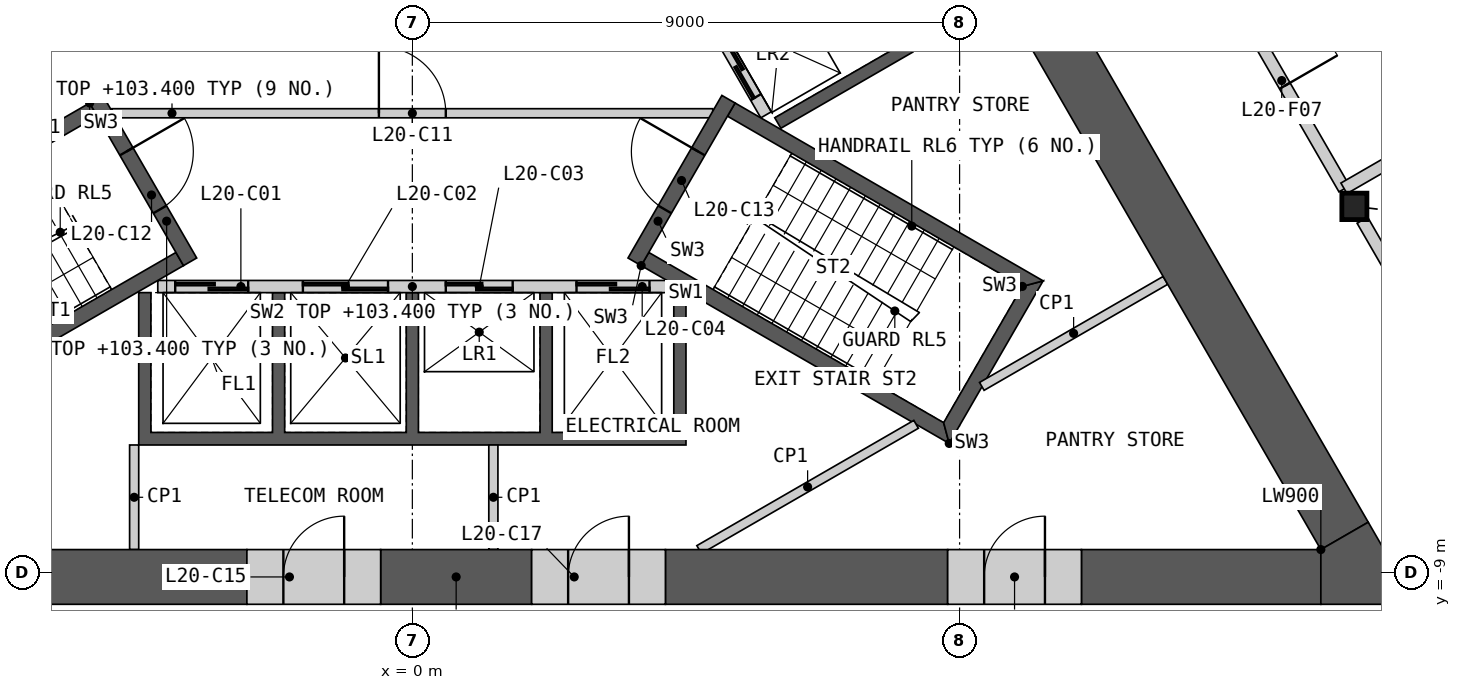
"""IFC4 building model, lengths in metres.
Left out: names, types, materials, properties, quantities, classifications, styles, units other than length and angle.
Written with IfcOpenShell. Run it as: python <this file> out.ifc"""

import sys

from ifc_helpers import new_model, si_unit, direction, frame, frame_2d, origin, origin_2d, place, context, subcontext, project, spatial, polyline, rectangle, i_section, outline, extrude, element, fill, save


model = new_model("IFC4")
c1 = context("Model", 3, precision=1e-05, world=origin(), true_north=direction((0.0, 1.0)))
c2 = subcontext(c1, "Body", "Model", "MODEL_VIEW")
j1 = project(units=[si_unit("LENGTHUNIT", "METRE"), si_unit("PLANEANGLEUNIT", "RADIAN")], contexts=[c1])
p1 = place(None, origin())
s1 = spatial("IfcSite", under=j1, at=p1, CompositionType="ELEMENT")
p2 = place(p1, origin())
s2 = spatial("IfcBuilding", under=s1, at=p2, CompositionType="ELEMENT")
p3 = place(p2, frame((0.0, 0.0, 99.6)))
s3 = spatial("IfcBuildingStorey", under=s2, at=p3, CompositionType="ELEMENT", Elevation=99.6)
p4 = place(p3, frame((15.493, -2.982, 0.0), z_axis=(0.0, 0.0, 1.0), x_axis=(1.0, 0.0, 0.0)))
e1 = element("IfcColumn", 1, at=p4, inside=s3, PredefinedType="COLUMN", context=c2, shape_type="SweptSolid", body=[
    extrude(i_section(OverallWidth=0.412, OverallDepth=0.435, WebThickness=0.036, FlangeThickness=0.057, at=origin_2d()), origin(), (0.0, 0.0, 1.0), 4.2),
])
p5 = place(p3, origin())
e2 = element("IfcWall", 2, at=p5, inside=s3, PredefinedType="SHEAR", context=c2, shape_type="SweptSolid", body=[
    extrude(outline(polyline([(4.5, -4.4), (4.5, -6.906), (-4.5, -6.906), (-4.5, -4.4), (-4.3, -4.4), (-4.3, -6.7), (-2.3, -6.7), (-2.3, -4.4), (-2.1, -4.4), (-2.1, -6.7), (-0.1, -6.7), (-0.1, -4.4), (0.1, -4.4), (0.1, -6.7), (2.1, -6.7), (2.1, -4.4), (2.3, -4.4), (2.3, -6.7), (4.3, -6.7), (4.3, -4.4), (4.5, -4.4)])), origin(), (0.0, 0.0, 1.0), 3.8),
])
p6 = place(p3, frame((-4.187, -4.3, 0.0), z_axis=(0.0, 0.0, 1.0), x_axis=(1.0, 0.0, 0.0)))
e3 = element("IfcWall", 3, at=p6, inside=s3, PredefinedType="SOLIDWALL", context=c2, shape_type="SweptSolid", body=[
    extrude(rectangle(XDim=8.373, YDim=0.2, at=frame_2d((4.187, 0.0))), origin(), (0.0, 0.0, 1.0), 3.8),
])
p7 = place(p6, frame((0.287, 0.0, 0.0)))
e4 = element("IfcOpeningElement", 4, at=p7, cuts=e3, PredefinedType="OPENING", context=c2, shape_type="SweptSolid", body=[
    extrude(rectangle(XDim=1.2, YDim=2.1, at=frame_2d((0.6, 1.05))), frame((0.0, 0.11, 0.0), z_axis=(0.0, -1.0, 0.0), x_axis=(1.0, 0.0, 0.0)), (0.0, 0.0, 1.0), 0.22),
])
p8 = place(p6, frame((2.387, 0.0, 0.0)))
e5 = element("IfcOpeningElement", 5, at=p8, cuts=e3, PredefinedType="OPENING", context=c2, shape_type="SweptSolid", body=[
    extrude(rectangle(XDim=1.4, YDim=2.1, at=frame_2d((0.7, 1.05))), frame((0.0, 0.11, 0.0), z_axis=(0.0, -1.0, 0.0), x_axis=(1.0, 0.0, 0.0)), (0.0, 0.0, 1.0), 0.22),
])
p9 = place(p6, frame((4.737, 0.0, 0.0)))
e6 = element("IfcOpeningElement", 6, at=p9, cuts=e3, PredefinedType="OPENING", context=c2, shape_type="SweptSolid", body=[
    extrude(rectangle(XDim=1.1, YDim=2.1, at=frame_2d((0.55, 1.05))), frame((0.0, 0.11, 0.0), z_axis=(0.0, -1.0, 0.0), x_axis=(1.0, 0.0, 0.0)), (0.0, 0.0, 1.0), 0.22),
])
p10 = place(p6, frame((6.887, 0.0, 0.0)))
e7 = element("IfcOpeningElement", 7, at=p10, cuts=e3, PredefinedType="OPENING", context=c2, shape_type="SweptSolid", body=[
    extrude(rectangle(XDim=1.2, YDim=2.1, at=frame_2d((0.6, 1.05))), frame((0.0, 0.11, 0.0), z_axis=(0.0, -1.0, 0.0), x_axis=(1.0, 0.0, 0.0)), (0.0, 0.0, 1.0), 0.22),
])
p11 = place(p3, origin())
e8 = element("IfcWall", 8, at=p11, inside=s3, PredefinedType="SHEAR", context=c2, shape_type="SweptSolid", body=[
    extrude(outline(polyline([(2.66, 4.192), (4.831, 5.445), (8.231, -0.444), (6.061, -1.697), (5.96, -1.524), (7.952, -0.374), (6.952, 1.358), (4.96, 0.208), (4.861, 0.381), (6.852, 1.531), (5.852, 3.263), (3.861, 2.113), (3.76, 2.287), (5.752, 3.437), (4.752, 5.169), (2.76, 4.019), (2.66, 4.192)])), origin(), (0.0, 0.0, 1.0), 3.8),
])
p12 = place(p3, frame((5.817, -1.476, 0.0), z_axis=(0.0, 0.0, 1.0), x_axis=(-0.500002616675, 0.866023893041, 0.0)))
e9 = element("IfcWall", 9, at=p12, inside=s3, PredefinedType="SOLIDWALL", context=c2, shape_type="SweptSolid", body=[
    extrude(rectangle(XDim=8.373, YDim=0.2, at=frame_2d((4.187, 0.0))), origin(), (0.0, 0.0, 1.0), 3.8),
])
p13 = place(p12, frame((0.337, 0.0, 0.0)))
e10 = element("IfcOpeningElement", 10, at=p13, cuts=e9, PredefinedType="OPENING", context=c2, shape_type="SweptSolid", body=[
    extrude(rectangle(XDim=1.1, YDim=2.1, at=frame_2d((0.55, 1.05))), frame((0.0, 0.11, 0.0), z_axis=(0.0, -1.0, 0.0), x_axis=(1.0, 0.0, 0.0)), (0.0, 0.0, 1.0), 0.22),
])
p14 = place(p12, frame((2.537, 0.0, 0.0)))
e11 = element("IfcOpeningElement", 11, at=p14, cuts=e9, PredefinedType="OPENING", context=c2, shape_type="SweptSolid", body=[
    extrude(rectangle(XDim=1.1, YDim=2.1, at=frame_2d((0.55, 1.05))), frame((0.0, 0.11, 0.0), z_axis=(0.0, -1.0, 0.0), x_axis=(1.0, 0.0, 0.0)), (0.0, 0.0, 1.0), 0.22),
])
p15 = place(p12, frame((4.737, 0.0, 0.0)))
e12 = element("IfcOpeningElement", 12, at=p15, cuts=e9, PredefinedType="OPENING", context=c2, shape_type="SweptSolid", body=[
    extrude(rectangle(XDim=1.1, YDim=2.1, at=frame_2d((0.55, 1.05))), frame((0.0, 0.11, 0.0), z_axis=(0.0, -1.0, 0.0), x_axis=(1.0, 0.0, 0.0)), (0.0, 0.0, 1.0), 0.22),
])
p16 = place(p12, frame((7.037, 0.0, 0.0)))
e13 = element("IfcOpeningElement", 13, at=p16, cuts=e9, PredefinedType="OPENING", context=c2, shape_type="SweptSolid", body=[
    extrude(rectangle(XDim=0.9, YDim=2.1, at=frame_2d((0.45, 1.05))), frame((0.0, 0.11, 0.0), z_axis=(0.0, -1.0, 0.0), x_axis=(1.0, 0.0, 0.0)), (0.0, 0.0, 1.0), 0.22),
])
p17 = place(p3, frame((-4.941, -1.45, 0.0), z_axis=(0.0, 0.0, 1.0), x_axis=(1.0, 0.0, 0.0)))
e14 = element("IfcWall", 14, at=p17, inside=s3, PredefinedType="PARTITIONING", context=c2, shape_type="SweptSolid", body=[
    extrude(rectangle(XDim=9.882, YDim=0.15, at=frame_2d((4.941, 0.0))), origin(), (0.0, 0.0, 1.0), 3.8),
])
p18 = place(p17, frame((4.391, 0.0, 0.0)))
e15 = element("IfcOpeningElement", 15, at=p18, cuts=e14, PredefinedType="OPENING", context=c2, shape_type="SweptSolid", body=[
    extrude(rectangle(XDim=1.1, YDim=2.1, at=frame_2d((0.55, 1.05))), frame((0.0, 0.085, 0.0), z_axis=(0.0, -1.0, 0.0), x_axis=(1.0, 0.0, 0.0)), (0.0, 0.0, 1.0), 0.17),
])
p19 = place(p3, origin())
e16 = element("IfcWall", 16, at=p19, inside=s3, PredefinedType="SHEAR", context=c2, shape_type="SweptSolid", body=[
    extrude(outline(polyline([(-5.307, -1.281), (-10.374, -4.206), (-10.032, -4.298), (-5.182, -1.498), (-5.307, -1.281)])), origin(), (0.0, 0.0, 1.0), 3.8),
])
p20 = place(p3, origin())
e17 = element("IfcWall", 17, at=p20, inside=s3, PredefinedType="SHEAR", context=c2, shape_type="SweptSolid", body=[
    extrude(outline(polyline([(-8.738, -6.539), (-8.83, -6.881), (-3.763, -3.956), (-3.888, -3.739), (-8.738, -6.539)])), origin(), (0.0, 0.0, 1.0), 3.8),
])
p21 = place(p3, frame((-5.199, -1.219, 0.0), z_axis=(0.0, 0.0, 1.0), x_axis=(0.499982516597, -0.866035497597, 0.0)))
e18 = element("IfcWall", 18, at=p21, inside=s3, PredefinedType="SHEAR", context=c2, shape_type="SweptSolid", body=[
    extrude(rectangle(XDim=3.088, YDim=0.25, at=frame_2d((1.544, 0.0))), origin(), (0.0, 0.0, 1.0), 3.8),
])
p22 = place(p21, frame((0.994, 0.0, 0.0)))
e19 = element("IfcOpeningElement", 19, at=p22, cuts=e18, PredefinedType="OPENING", context=c2, shape_type="SweptSolid", body=[
    extrude(rectangle(XDim=1.1, YDim=2.1, at=frame_2d((0.55, 1.05))), frame((0.0, 0.135, 0.0), z_axis=(0.0, -1.0, 0.0), x_axis=(1.0, 0.0, 0.0)), (0.0, 0.0, 1.0), 0.27),
])
p23 = place(p3, origin())
e20 = element("IfcWall", 20, at=p23, inside=s3, PredefinedType="SHEAR", context=c2, shape_type="SweptSolid", body=[
    extrude(outline(polyline([(3.763, -3.956), (8.83, -6.881), (8.738, -6.539), (3.888, -3.739), (3.763, -3.956)])), origin(), (0.0, 0.0, 1.0), 3.8),
])
p24 = place(p3, origin())
e21 = element("IfcWall", 21, at=p24, inside=s3, PredefinedType="SHEAR", context=c2, shape_type="SweptSolid", body=[
    extrude(outline(polyline([(8.83, -6.881), (10.374, -4.206), (10.032, -4.298), (8.738, -6.539), (8.83, -6.881)])), origin(), (0.0, 0.0, 1.0), 3.8),
])
p25 = place(p3, origin())
e22 = element("IfcWall", 22, at=p25, inside=s3, PredefinedType="SHEAR", context=c2, shape_type="SweptSolid", body=[
    extrude(outline(polyline([(10.032, -4.298), (10.374, -4.206), (5.307, -1.281), (5.182, -1.498), (10.032, -4.298)])), origin(), (0.0, 0.0, 1.0), 3.8),
])
p26 = place(p3, frame((3.655, -3.893, 0.0), z_axis=(0.0, 0.0, 1.0), x_axis=(0.499982516597, 0.866035497597, 0.0)))
e23 = element("IfcWall", 23, at=p26, inside=s3, PredefinedType="SHEAR", context=c2, shape_type="SweptSolid", body=[
    extrude(rectangle(XDim=3.088, YDim=0.25, at=frame_2d((1.544, 0.0))), origin(), (0.0, 0.0, 1.0), 3.8),
])
p27 = place(p26, frame((0.994, 0.0, 0.0)))
e24 = element("IfcOpeningElement", 24, at=p27, cuts=e23, PredefinedType="OPENING", context=c2, shape_type="SweptSolid", body=[
    extrude(rectangle(XDim=1.1, YDim=2.1, at=frame_2d((0.55, 1.05))), frame((0.0, 0.135, 0.0), z_axis=(0.0, -1.0, 0.0), x_axis=(1.0, 0.0, 0.0)), (0.0, 0.0, 1.0), 0.27),
])
for number, where, z_axis, x_axis in (
    (25, (-4.575, -6.906, 0.0), (0.0, 0.0, 1.0), (0.0, -1.0, 0.0)),
    (26, (1.333, -8.626, 0.0), (0.0, 0.0, 1.0), (0.0, 1.0, 0.0)),
):
    element("IfcWall", number, at=place(p3, frame(where, z_axis=z_axis, x_axis=x_axis)), inside=s3, PredefinedType="PARTITIONING", context=c2, shape_type="SweptSolid", body=[
        extrude(rectangle(XDim=1.72, YDim=0.15, at=frame_2d((0.86, 0.0))), origin(), (0.0, 0.0, 1.0), 3.8),
    ])
p28 = place(p3, frame((8.285, -6.566, 0.0), z_axis=(0.0, 0.0, 1.0), x_axis=(-0.866039554287, -0.49997548981, 0.0)))
e27 = element("IfcWall", 27, at=p28, inside=s3, PredefinedType="PARTITIONING", context=c2, shape_type="SweptSolid", body=[
    extrude(rectangle(XDim=4.12, YDim=0.15, at=frame_2d((2.06, 0.0))), origin(), (0.0, 0.0, 1.0), 3.8),
])
p29 = place(p3, frame((12.385, -4.199, 0.0), z_axis=(0.0, 0.0, 1.0), x_axis=(-0.86604566135, -0.499964911226, 0.0)))
e28 = element("IfcWall", 28, at=p29, inside=s3, PredefinedType="PARTITIONING", context=c2, shape_type="SweptSolid", body=[
    extrude(rectangle(XDim=3.487, YDim=0.15, at=frame_2d((1.743, 0.0))), origin(), (0.0, 0.0, 1.0), 3.8),
])
p30 = place(p3, frame((4.162, -9.076, 0.0), z_axis=(0.0, 0.0, 1.0), x_axis=(1.0, 0.0, 0.0)))
e29 = element("IfcWall", 29, at=p30, inside=s3, PredefinedType="SHEAR", context=c2, shape_type="SweptSolid", body=[
    extrude(rectangle(XDim=4.642, YDim=0.9, at=frame_2d((2.321, 0.0))), origin(), (0.0, 0.0, 1.0), 3.8),
])
p31 = place(p3, frame((-7.115, -9.076, 0.0), z_axis=(0.0, 0.0, 1.0), x_axis=(1.0, 0.0, 0.0)))
e30 = element("IfcWall", 30, at=p31, inside=s3, PredefinedType="SHEAR", context=c2, shape_type="SweptSolid", body=[
    extrude(rectangle(XDim=4.393, YDim=0.9, at=frame_2d((2.197, 0.0))), origin(), (0.0, 0.0, 1.0), 3.8),
])
p32 = place(p3, frame((11.004, -9.076, 0.0), z_axis=(0.0, 0.0, 1.0), x_axis=(1.0, 0.0, 0.0)))
e31 = element("IfcWall", 31, at=p32, inside=s3, PredefinedType="SHEAR", context=c2, shape_type="SweptSolid", body=[
    extrude(rectangle(XDim=3.937, YDim=0.9, at=frame_2d((1.969, 0.0))), origin(), (0.0, 0.0, 1.0), 3.8),
])
p33 = place(p3, frame((-0.521, -9.076, 0.0), z_axis=(0.0, 0.0, 1.0), x_axis=(1.0, 0.0, 0.0)))
e32 = element("IfcWall", 32, at=p33, inside=s3, PredefinedType="SHEAR", context=c2, shape_type="SweptSolid", body=[
    extrude(rectangle(XDim=2.483, YDim=0.9, at=frame_2d((1.242, 0.0))), origin(), (0.0, 0.0, 1.0), 3.8),
])
p34 = place(p3, frame((15.331, -8.401, 0.0), z_axis=(0.0, 0.0, 1.0), x_axis=(-0.499996094196, 0.86602765879, 0.0)))
e33 = element("IfcWall", 33, at=p34, inside=s3, PredefinedType="SHEAR", context=c2, shape_type="SweptSolid", body=[
    extrude(rectangle(XDim=10.014, YDim=0.9, at=frame_2d((5.007, 0.0))), origin(), (0.0, 0.0, 1.0), 3.8),
])
p35 = place(p3, origin())
e34 = element("IfcWall", 34, at=p35, inside=s3, PredefinedType="SHEAR", context=c2, shape_type="SweptSolid", body=[
    extrude(outline(polyline([(14.941, -8.626), (15.721, -8.176), (16.5, -9.526), (14.941, -9.526), (14.941, -8.626)])), origin(), (0.0, 0.0, 1.0), 3.8),
])
p36 = place(p3, frame((-2.721, -9.076, 0.0), z_axis=(0.0, 0.0, 1.0), x_axis=(1.0, 0.0, 0.0)))
e35 = element("IfcWall", 35, at=p36, inside=s3, PredefinedType="SHEAR", context=c2, shape_type="SweptSolid", body=[
    extrude(rectangle(XDim=2.2, YDim=0.9, at=frame_2d((1.1, 0.0))), origin(), (0.0, 0.0, 1.0), 3.8),
])
p37 = place(p36, frame((0.6, 0.0, 0.0)))
e36 = element("IfcOpeningElement", 36, at=p37, cuts=e35, PredefinedType="OPENING", context=c2, shape_type="SweptSolid", body=[
    extrude(rectangle(XDim=1.0, YDim=2.1, at=frame_2d((0.5, 1.05))), frame((0.0, 0.46, 0.0), z_axis=(0.0, -1.0, 0.0), x_axis=(1.0, 0.0, 0.0)), (0.0, 0.0, 1.0), 0.92),
])
p38 = place(p3, frame((8.804, -9.076, 0.0), z_axis=(0.0, 0.0, 1.0), x_axis=(1.0, 0.0, 0.0)))
e37 = element("IfcWall", 37, at=p38, inside=s3, PredefinedType="SHEAR", context=c2, shape_type="SweptSolid", body=[
    extrude(rectangle(XDim=2.2, YDim=0.9, at=frame_2d((1.1, 0.0))), origin(), (0.0, 0.0, 1.0), 3.8),
])
p39 = place(p38, frame((0.6, 0.0, 0.0)))
e38 = element("IfcOpeningElement", 38, at=p39, cuts=e37, PredefinedType="OPENING", context=c2, shape_type="SweptSolid", body=[
    extrude(rectangle(XDim=1.0, YDim=2.1, at=frame_2d((0.5, 1.05))), frame((0.0, 0.46, 0.0), z_axis=(0.0, -1.0, 0.0), x_axis=(1.0, 0.0, 0.0)), (0.0, 0.0, 1.0), 0.92),
])
p40 = place(p3, frame((1.962, -9.076, 0.0), z_axis=(0.0, 0.0, 1.0), x_axis=(1.0, 0.0, 0.0)))
e39 = element("IfcWall", 39, at=p40, inside=s3, PredefinedType="SHEAR", context=c2, shape_type="SweptSolid", body=[
    extrude(rectangle(XDim=2.2, YDim=0.9, at=frame_2d((1.1, 0.0))), origin(), (0.0, 0.0, 1.0), 3.8),
])
p41 = place(p40, frame((0.6, 0.0, 0.0)))
e40 = element("IfcOpeningElement", 40, at=p41, cuts=e39, PredefinedType="OPENING", context=c2, shape_type="SweptSolid", body=[
    extrude(rectangle(XDim=1.0, YDim=2.1, at=frame_2d((0.5, 1.05))), frame((0.0, 0.46, 0.0), z_axis=(0.0, -1.0, 0.0), x_axis=(1.0, 0.0, 0.0)), (0.0, 0.0, 1.0), 0.92),
])
p42 = place(p3, frame((10.46, 5.736, 0.0), z_axis=(0.0, 0.0, 1.0), x_axis=(0.500010522431, -0.866019328571, 0.0)))
e41 = element("IfcWall", 41, at=p42, inside=s3, PredefinedType="PARTITIONING", context=c2, shape_type="SweptSolid", body=[
    extrude(rectangle(XDim=9.733, YDim=0.2, at=frame_2d((4.866, 0.0))), origin(), (0.0, 0.0, 1.0), 3.8),
])
p43 = place(p42, frame((6.776, 0.0, 0.0)))
e42 = element("IfcOpeningElement", 42, at=p43, cuts=e41, PredefinedType="OPENING", context=c2, shape_type="SweptSolid", body=[
    extrude(rectangle(XDim=1.0, YDim=2.1, at=frame_2d((0.5, 1.05))), frame((0.0, 0.11, 0.0), z_axis=(0.0, -1.0, 0.0), x_axis=(1.0, 0.0, 0.0)), (0.0, 0.0, 1.0), 0.22),
])
p44 = place(p42, frame((1.856, 0.0, 0.0)))
e43 = element("IfcOpeningElement", 43, at=p44, cuts=e41, PredefinedType="OPENING", context=c2, shape_type="SweptSolid", body=[
    extrude(rectangle(XDim=1.0, YDim=2.1, at=frame_2d((0.5, 1.05))), frame((0.0, 0.11, 0.0), z_axis=(0.0, -1.0, 0.0), x_axis=(1.0, 0.0, 0.0)), (0.0, 0.0, 1.0), 0.22),
])
p45 = place(p3, frame((15.624, -3.209, 0.0), z_axis=(0.0, 0.0, 1.0), x_axis=(0.499997920671, -0.866026604282, 0.0)))
e44 = element("IfcWall", 44, at=p45, inside=s3, PredefinedType="PARTITIONING", context=c2, shape_type="SweptSolid", body=[
    extrude(rectangle(XDim=6.24, YDim=0.2, at=frame_2d((3.12, 0.0))), origin(), (0.0, 0.0, 1.0), 3.8),
])
p46 = place(p45, frame((2.57, 0.0, 0.0)))
e45 = element("IfcOpeningElement", 45, at=p46, cuts=e44, PredefinedType="OPENING", context=c2, shape_type="SweptSolid", body=[
    extrude(rectangle(XDim=1.0, YDim=2.1, at=frame_2d((0.5, 1.05))), frame((0.0, 0.11, 0.0), z_axis=(0.0, -1.0, 0.0), x_axis=(1.0, 0.0, 0.0)), (0.0, 0.0, 1.0), 0.22),
])
p47 = place(p3, frame((15.321, -2.684, 0.0), z_axis=(0.0, 0.0, 1.0), x_axis=(0.866029068465, 0.499993652534, 0.0)))
e46 = element("IfcWall", 46, at=p47, inside=s3, PredefinedType="PARTITIONING", context=c2, shape_type="SweptSolid", body=[
    extrude(rectangle(XDim=13.066, YDim=0.2, at=frame_2d((6.533, 0.0))), origin(), (0.0, 0.0, 1.0), 2.885),
])
p48 = place(p7, origin())
e47 = element("IfcDoor", 47, at=p48, inside=s3, OperationType="SLIDING_TO_LEFT", PredefinedType="DOOR", context=c2, shape_type="SweptSolid", body=[
    extrude(rectangle(XDim=1.2, YDim=2.1, at=frame_2d((0.6, 1.05))), frame((0.0, 0.025, 0.0), z_axis=(0.0, -1.0, 0.0), x_axis=(1.0, 0.0, 0.0)), (0.0, 0.0, 1.0), 0.05),
])
fill(e4, e47)
p49 = place(p8, origin())
e48 = element("IfcDoor", 48, at=p49, inside=s3, OperationType="SLIDING_TO_LEFT", PredefinedType="DOOR", context=c2, shape_type="SweptSolid", body=[
    extrude(rectangle(XDim=1.4, YDim=2.1, at=frame_2d((0.7, 1.05))), frame((0.0, 0.025, 0.0), z_axis=(0.0, -1.0, 0.0), x_axis=(1.0, 0.0, 0.0)), (0.0, 0.0, 1.0), 0.05),
])
fill(e5, e48)
p50 = place(p9, origin())
e49 = element("IfcDoor", 49, at=p50, inside=s3, OperationType="SLIDING_TO_LEFT", PredefinedType="DOOR", context=c2, shape_type="SweptSolid", body=[
    extrude(rectangle(XDim=1.1, YDim=2.1, at=frame_2d((0.55, 1.05))), frame((0.0, 0.025, 0.0), z_axis=(0.0, -1.0, 0.0), x_axis=(1.0, 0.0, 0.0)), (0.0, 0.0, 1.0), 0.05),
])
fill(e6, e49)
p51 = place(p10, origin())
e50 = element("IfcDoor", 50, at=p51, inside=s3, OperationType="SLIDING_TO_LEFT", PredefinedType="DOOR", context=c2, shape_type="SweptSolid", body=[
    extrude(rectangle(XDim=1.2, YDim=2.1, at=frame_2d((0.6, 1.05))), frame((0.0, 0.025, 0.0), z_axis=(0.0, -1.0, 0.0), x_axis=(1.0, 0.0, 0.0)), (0.0, 0.0, 1.0), 0.05),
])
fill(e7, e50)
p52 = place(p13, origin())
e51 = element("IfcDoor", 51, at=p52, inside=s3, OperationType="SLIDING_TO_LEFT", PredefinedType="DOOR", context=c2, shape_type="SweptSolid", body=[
    extrude(rectangle(XDim=1.1, YDim=2.1, at=frame_2d((0.55, 1.05))), frame((0.0, 0.025, 0.0), z_axis=(0.0, -1.0, 0.0), x_axis=(1.0, 0.0, 0.0)), (0.0, 0.0, 1.0), 0.05),
])
fill(e10, e51)
p53 = place(p18, origin())
e52 = element("IfcDoor", 52, at=p53, inside=s3, OperationType="SINGLE_SWING_LEFT", PredefinedType="DOOR", context=c2, shape_type="SweptSolid", body=[
    extrude(rectangle(XDim=1.1, YDim=2.1, at=frame_2d((0.55, 1.05))), frame((0.0, 0.025, 0.0), z_axis=(0.0, -1.0, 0.0), x_axis=(1.0, 0.0, 0.0)), (0.0, 0.0, 1.0), 0.05),
])
fill(e15, e52)
p54 = place(p22, origin())
e53 = element("IfcDoor", 53, at=p54, inside=s3, OperationType="SINGLE_SWING_LEFT", PredefinedType="DOOR", context=c2, shape_type="SweptSolid", body=[
    extrude(rectangle(XDim=1.1, YDim=2.1, at=frame_2d((0.55, 1.05))), frame((0.0, 0.025, 0.0), z_axis=(0.0, -1.0, 0.0), x_axis=(1.0, 0.0, 0.0)), (0.0, 0.0, 1.0), 0.05),
])
fill(e19, e53)
p55 = place(p27, origin())
e54 = element("IfcDoor", 54, at=p55, inside=s3, OperationType="SINGLE_SWING_RIGHT", PredefinedType="DOOR", context=c2, shape_type="SweptSolid", body=[
    extrude(rectangle(XDim=1.1, YDim=2.1, at=frame_2d((0.55, 1.05))), frame((0.0, 0.025, 0.0), z_axis=(0.0, -1.0, 0.0), x_axis=(1.0, 0.0, 0.0)), (0.0, 0.0, 1.0), 0.05),
])
fill(e24, e54)
p56 = place(p37, origin())
e55 = element("IfcDoor", 55, at=p56, inside=s3, OperationType="SINGLE_SWING_RIGHT", PredefinedType="DOOR", context=c2, shape_type="SweptSolid", body=[
    extrude(rectangle(XDim=1.0, YDim=2.1, at=frame_2d((0.5, 1.05))), frame((0.0, 0.205, 0.0), z_axis=(0.0, -1.0, 0.0), x_axis=(1.0, 0.0, 0.0)), (0.0, 0.0, 1.0), 0.05),
])
fill(e36, e55)
p57 = place(p39, origin())
e56 = element("IfcDoor", 56, at=p57, inside=s3, OperationType="SINGLE_SWING_RIGHT", PredefinedType="DOOR", context=c2, shape_type="SweptSolid", body=[
    extrude(rectangle(XDim=1.0, YDim=2.1, at=frame_2d((0.5, 1.05))), frame((0.0, 0.205, 0.0), z_axis=(0.0, -1.0, 0.0), x_axis=(1.0, 0.0, 0.0)), (0.0, 0.0, 1.0), 0.05),
])
fill(e38, e56)
p58 = place(p41, origin())
e57 = element("IfcDoor", 57, at=p58, inside=s3, OperationType="SINGLE_SWING_RIGHT", PredefinedType="DOOR", context=c2, shape_type="SweptSolid", body=[
    extrude(rectangle(XDim=1.0, YDim=2.1, at=frame_2d((0.5, 1.05))), frame((0.0, 0.205, 0.0), z_axis=(0.0, -1.0, 0.0), x_axis=(1.0, 0.0, 0.0)), (0.0, 0.0, 1.0), 0.05),
])
fill(e40, e57)
p59 = place(p43, origin())
e58 = element("IfcDoor", 58, at=p59, inside=s3, OperationType="SINGLE_SWING_RIGHT", PredefinedType="DOOR", context=c2, shape_type="SweptSolid", body=[
    extrude(rectangle(XDim=1.0, YDim=2.1, at=frame_2d((0.5, 1.05))), frame((0.0, 0.025, 0.0), z_axis=(0.0, -1.0, 0.0), x_axis=(1.0, 0.0, 0.0)), (0.0, 0.0, 1.0), 0.05),
])
fill(e42, e58)
save(model, sys.argv[1])
